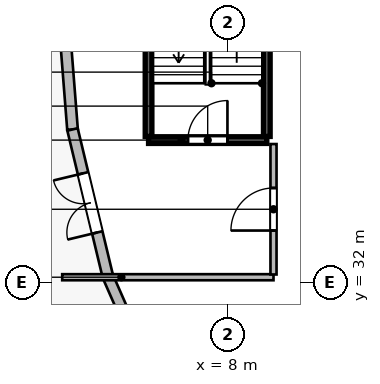
"""IFC4 building model, lengths in metres.
Left out: names, types, materials, properties, quantities, classifications, styles, units other than length and angle.
Written with IfcOpenShell. Run it as: python <this file> out.ifc"""

import sys

from ifc_helpers import new_model, si_unit, direction, frame, frame_2d, origin, origin_2d, place, context, subcontext, project, spatial, rectangle, extrude, source, transform, mapped, element, fill, save


model = new_model("IFC4")
c1 = context("Model", 3, precision=1e-05, world=origin(), true_north=direction((0.0, 1.0)))
c2 = subcontext(c1, "Body", "Model", "MODEL_VIEW")
j1 = project(units=[si_unit("LENGTHUNIT", "METRE"), si_unit("PLANEANGLEUNIT", "RADIAN")], contexts=[c1])
p1 = place(None, origin())
s1 = spatial("IfcSite", under=j1, at=p1, CompositionType="ELEMENT")
p2 = place(p1, origin())
s2 = spatial("IfcBuilding", under=s1, at=p2, CompositionType="ELEMENT")
p3 = place(p2, origin())
s3 = spatial("IfcBuildingStorey", under=s2, at=p3, CompositionType="ELEMENT", Elevation=0.0)
m1 = source(origin(), c2, "Body", "SweptSolid", [
    extrude(rectangle(XDim=2.0, YDim=2.0, at=origin_2d()), origin(), (0.0, 0.0, 1.0), 6.0),
])
p4 = place(p3, frame((10.86, 30.137, 0.0), z_axis=(0.0, 0.0, 1.0), x_axis=(-0.923879532511, -0.382683432365, 0.0)))
e1 = element("IfcColumn", 1, at=p4, inside=s3, PredefinedType="COLUMN", context=c2, shape_type="MappedRepresentation", body=[
    mapped(m1, transform((0.0, 0.0, 0.0), scale=1.0)),
])
m2 = source(origin(), c2, "Body", "SweptSolid", [
    extrude(rectangle(XDim=4.975, YDim=0.35, at=frame_2d((2.488, 0.0))), origin(), (0.0, 0.0, 1.0), 5.7),
])
p5 = place(p3, frame((2.889, 37.04, 0.0), z_axis=(0.0, 0.0, 1.0), x_axis=(-0.07826870534, 0.996932299489, 0.0)))
e2 = element("IfcWall", 2, at=p5, inside=s3, PredefinedType="SOLIDWALL", context=c2, shape_type="MappedRepresentation", body=[
    mapped(m2, transform((0.0, 0.0, 0.0), scale=1.0)),
])
m3 = source(origin(), c2, "Body", "SweptSolid", [
    extrude(rectangle(XDim=4.969, YDim=0.35, at=frame_2d((2.484, 0.0))), origin(), (0.0, 0.0, 1.0), 5.7),
])
p6 = place(p3, frame((4.05, 32.208, 0.0), z_axis=(0.0, 0.0, 1.0), x_axis=(-0.233623809029, 0.972327062184, 0.0)))
e3 = element("IfcWall", 3, at=p6, inside=s3, PredefinedType="SOLIDWALL", context=c2, shape_type="MappedRepresentation", body=[
    mapped(m3, transform((0.0, 0.0, 0.0), scale=1.0)),
])
p7 = place(p6, frame((1.485, 0.0, 0.0)))
e4 = element("IfcOpeningElement", 4, at=p7, cuts=e3, PredefinedType="OPENING", context=c2, shape_type="SweptSolid", body=[
    extrude(rectangle(XDim=2.0, YDim=2.4, at=frame_2d((1.0, 1.2))), frame((0.0, 0.185, 0.0), z_axis=(0.0, -1.0, 0.0), x_axis=(1.0, 0.0, 0.0)), (0.0, 0.0, 1.0), 0.37),
])
m4 = source(origin(), c2, "Body", "SweptSolid", [
    extrude(rectangle(XDim=4.756, YDim=0.35, at=frame_2d((2.378, 0.0))), origin(), (0.0, 0.0, 1.0), 5.7),
])
p8 = place(p3, frame((5.963, 27.854, 0.0), z_axis=(0.0, 0.0, 1.0), x_axis=(-0.402248274654, 0.915530625123, 0.0)))
e5 = element("IfcWall", 5, at=p8, inside=s3, PredefinedType="SOLIDWALL", context=c2, shape_type="MappedRepresentation", body=[
    mapped(m4, transform((0.0, 0.0, 0.0), scale=1.0)),
])
m5 = source(origin(), c2, "Body", "SweptSolid", [
    extrude(rectangle(XDim=3.89, YDim=0.22, at=frame_2d((1.945, 0.0))), origin(), (0.0, 0.0, 1.0), 6.0),
])
p9 = place(p3, frame((5.39, 36.69, 0.0), z_axis=(0.0, 0.0, 1.0), x_axis=(1.0, 0.0, 0.0)))
e6 = element("IfcWall", 6, at=p9, inside=s3, PredefinedType="SOLIDWALL", context=c2, shape_type="MappedRepresentation", body=[
    mapped(m5, transform((0.0, 0.0, 0.0), scale=1.0)),
])
p10 = place(p9, frame((1.295, 0.0, 0.0)))
e7 = element("IfcOpeningElement", 7, at=p10, cuts=e6, PredefinedType="OPENING", context=c2, shape_type="SweptSolid", body=[
    extrude(rectangle(XDim=1.3, YDim=2.15, at=frame_2d((0.65, 1.075))), frame((0.0, 0.12, 0.0), z_axis=(0.0, -1.0, 0.0), x_axis=(1.0, 0.0, 0.0)), (0.0, 0.0, 1.0), 0.24),
])
m6 = source(origin(), c2, "Body", "SweptSolid", [
    extrude(rectangle(XDim=10.38, YDim=0.22, at=frame_2d((5.19, 0.0))), origin(), (0.0, 0.0, 1.0), 6.0),
])
for number, where, z_axis, x_axis in (
    (8, (5.39, 36.81, 0.0), (0.0, 0.0, 1.0), (0.0, 1.0, 0.0)),
    (9, (9.28, 36.81, 0.0), (0.0, 0.0, 1.0), (0.0, 1.0, 0.0)),
):
    element("IfcWall", number, at=place(p3, frame(where, z_axis=z_axis, x_axis=x_axis)), inside=s3, PredefinedType="SOLIDWALL", context=c2, shape_type="MappedRepresentation", body=[
        mapped(m6, transform((0.0, 0.0, 0.0), scale=1.0)),
    ])
m7 = source(origin(), c2, "Body", "SweptSolid", [
    extrude(rectangle(XDim=6.95, YDim=0.2, at=frame_2d((3.475, 0.0))), origin(), (0.0, 0.0, 1.0), 5.7),
])
p11 = place(p3, frame((2.55, 32.18, 0.0), z_axis=(0.0, 0.0, 1.0), x_axis=(1.0, 0.0, 0.0)))
e10 = element("IfcWall", 10, at=p11, inside=s3, PredefinedType="SOLIDWALL", context=c2, shape_type="MappedRepresentation", body=[
    mapped(m7, transform((0.0, 0.0, 0.0), scale=1.0)),
])
m8 = source(origin(), c2, "Body", "SweptSolid", [
    extrude(rectangle(XDim=4.29, YDim=0.2, at=frame_2d((2.145, 0.0))), origin(), (0.0, 0.0, 1.0), 5.7),
])
p12 = place(p3, frame((9.5, 32.27, 0.0), z_axis=(0.0, 0.0, 1.0), x_axis=(0.0, 1.0, 0.0)))
e11 = element("IfcWall", 11, at=p12, inside=s3, PredefinedType="SOLIDWALL", context=c2, shape_type="MappedRepresentation", body=[
    mapped(m8, transform((0.0, 0.0, 0.0), scale=1.0)),
])
p13 = place(p12, frame((1.445, 0.0, 0.0)))
e12 = element("IfcOpeningElement", 12, at=p13, cuts=e11, PredefinedType="OPENING", context=c2, shape_type="SweptSolid", body=[
    extrude(rectangle(XDim=1.4, YDim=2.15, at=frame_2d((0.7, 1.075))), frame((0.0, 0.11, 0.0), z_axis=(0.0, -1.0, 0.0), x_axis=(1.0, 0.0, 0.0)), (0.0, 0.0, 1.0), 0.22),
])
m9 = source(origin(), c2, "Body", "SweptSolid", [
    extrude(rectangle(XDim=2.0, YDim=2.4, at=frame_2d((1.0, 1.2))), frame((0.0, 0.025, 0.0), z_axis=(0.0, -1.0, 0.0), x_axis=(1.0, 0.0, 0.0)), (0.0, 0.0, 1.0), 0.05),
])
p14 = place(p7, origin())
e13 = element("IfcDoor", 13, at=p14, inside=s3, OperationType="DOUBLE_DOOR_SINGLE_SWING", PredefinedType="DOOR", context=c2, shape_type="MappedRepresentation", body=[
    mapped(m9, transform((0.0, 0.0, 0.0), scale=1.0)),
])
fill(e4, e13)
m10 = source(origin(), c2, "Body", "SweptSolid", [
    extrude(rectangle(XDim=1.3, YDim=2.15, at=frame_2d((0.65, 1.075))), frame((0.0, 0.025, 0.0), z_axis=(0.0, -1.0, 0.0), x_axis=(1.0, 0.0, 0.0)), (0.0, 0.0, 1.0), 0.05),
])
p15 = place(p10, origin())
e14 = element("IfcDoor", 14, at=p15, inside=s3, OperationType="SINGLE_SWING_RIGHT", PredefinedType="DOOR", context=c2, shape_type="MappedRepresentation", body=[
    mapped(m10, transform((0.0, 0.0, 0.0), scale=1.0)),
])
fill(e7, e14)
m11 = source(origin(), c2, "Body", "SweptSolid", [
    extrude(rectangle(XDim=1.4, YDim=2.15, at=frame_2d((0.7, 1.075))), frame((0.0, 0.025, 0.0), z_axis=(0.0, -1.0, 0.0), x_axis=(1.0, 0.0, 0.0)), (0.0, 0.0, 1.0), 0.05),
])
p16 = place(p13, origin())
e15 = element("IfcDoor", 15, at=p16, inside=s3, OperationType="SINGLE_SWING_LEFT", PredefinedType="DOOR", context=c2, shape_type="MappedRepresentation", body=[
    mapped(m11, transform((0.0, 0.0, 0.0), scale=1.0)),
])
fill(e12, e15)
save(model, sys.argv[1])
